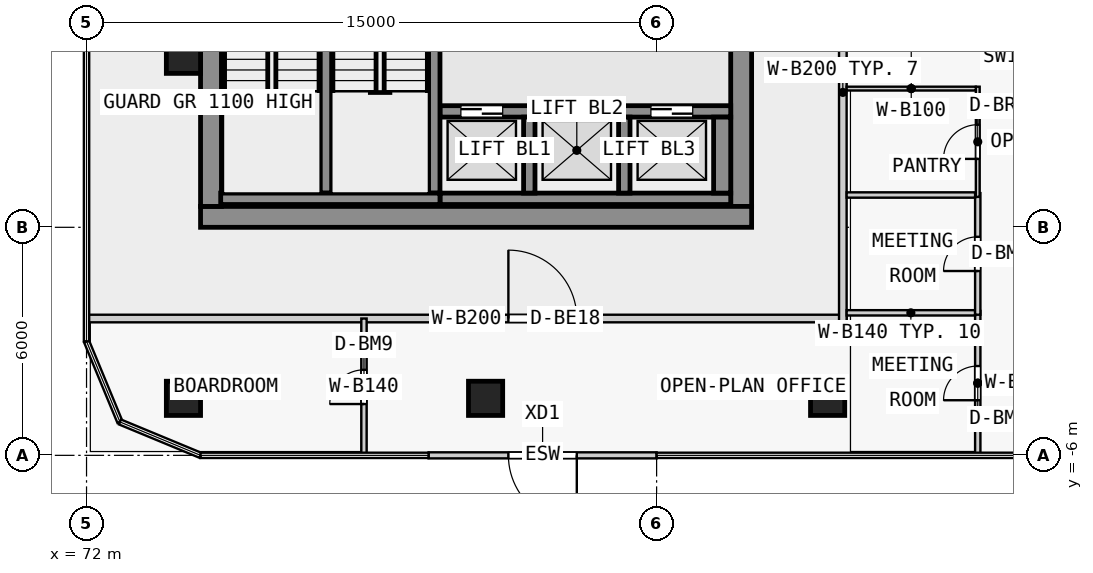
"""IFC4 building model, lengths in metres.
Left out: names, types, materials, properties, quantities, classifications, styles, units other than length and angle.
Written with IfcOpenShell. Run it as: python <this file> out.ifc"""

import sys

from ifc_helpers import new_model, si_unit, direction, frame, frame_2d, origin, origin_2d, place, context, subcontext, project, spatial, rectangle, extrude, element, fill, save


model = new_model("IFC4")
c1 = context("Model", 3, precision=1e-05, world=origin(), true_north=direction((0.0, 1.0)))
c2 = subcontext(c1, "Body", "Model", "MODEL_VIEW")
j1 = project(units=[si_unit("LENGTHUNIT", "METRE"), si_unit("PLANEANGLEUNIT", "RADIAN")], contexts=[c1])
p1 = place(None, origin())
s1 = spatial("IfcSite", under=j1, at=p1, CompositionType="ELEMENT")
p2 = place(p1, origin())
s2 = spatial("IfcBuilding", under=s1, at=p2, CompositionType="ELEMENT")
p3 = place(p2, frame((0.0, 0.0, 26.8)))
s3 = spatial("IfcBuildingStorey", under=s2, at=p3, CompositionType="ELEMENT", Elevation=26.8)
for number, where, z_axis, x_axis in (
    (1, (74.55, -4.5, 0.0), (0.0, 0.0, 1.0), (1.0, 0.0, 0.0)),
    (2, (82.5, -4.5, 0.0), (0.0, 0.0, 1.0), (1.0, 0.0, 0.0)),
    (3, (91.5, -4.5, 0.0), (0.0, 0.0, 1.0), (1.0, 0.0, 0.0)),
    (4, (74.55, 4.5, 0.0), (0.0, 0.0, 1.0), (1.0, 0.0, 0.0)),
):
    element("IfcColumn", number, at=place(p3, frame(where, z_axis=z_axis, x_axis=x_axis)), inside=s3, PredefinedType="COLUMN", context=c2, shape_type="SweptSolid", body=[
        extrude(rectangle(XDim=0.9, YDim=0.9, at=origin_2d()), origin(), (0.0, 0.0, 1.0), 3.5),
    ])
p4 = place(p3, frame((75.0, 0.275, 0.0), z_axis=(0.0, 0.0, 1.0), x_axis=(1.0, 0.0, 0.0)))
e5 = element("IfcWall", 5, at=p4, inside=s3, PredefinedType="SHEAR", context=c2, shape_type="SweptSolid", body=[
    extrude(rectangle(XDim=14.5, YDim=0.55, at=frame_2d((7.25, 0.0))), origin(), (0.0, 0.0, 1.0), 3.25),
])
p5 = place(p3, frame((75.275, 0.55, 0.0), z_axis=(0.0, 0.0, 1.0), x_axis=(0.0, 1.0, 0.0)))
e6 = element("IfcWall", 6, at=p5, inside=s3, PredefinedType="SHEAR", context=c2, shape_type="SweptSolid", body=[
    extrude(rectangle(XDim=16.9, YDim=0.55, at=frame_2d((8.45, 0.0))), origin(), (0.0, 0.0, 1.0), 3.25),
])
p6 = place(p5, frame((7.825, 0.0, 0.0)))
e7 = element("IfcOpeningElement", 7, at=p6, cuts=e6, PredefinedType="OPENING", context=c2, shape_type="SweptSolid", body=[
    extrude(rectangle(XDim=1.8, YDim=2.1, at=frame_2d((0.9, 1.05))), frame((0.0, 0.285, 0.0), z_axis=(0.0, -1.0, 0.0), x_axis=(1.0, 0.0, 0.0)), (0.0, 0.0, 1.0), 0.57),
])
p7 = place(p3, frame((89.225, 0.55, 0.0), z_axis=(0.0, 0.0, 1.0), x_axis=(0.0, 1.0, 0.0)))
e8 = element("IfcWall", 8, at=p7, inside=s3, PredefinedType="SHEAR", context=c2, shape_type="SweptSolid", body=[
    extrude(rectangle(XDim=16.9, YDim=0.55, at=frame_2d((8.45, 0.0))), origin(), (0.0, 0.0, 1.0), 3.25),
])
p8 = place(p7, frame((7.55, 0.0, 0.0)))
e9 = element("IfcOpeningElement", 9, at=p8, cuts=e8, PredefinedType="OPENING", context=c2, shape_type="SweptSolid", body=[
    extrude(rectangle(XDim=1.8, YDim=2.1, at=frame_2d((0.9, 1.05))), frame((0.0, 0.285, 0.0), z_axis=(0.0, -1.0, 0.0), x_axis=(1.0, 0.0, 0.0)), (0.0, 0.0, 1.0), 0.57),
])
p9 = place(p3, frame((75.53, 0.75, 0.0), z_axis=(0.0, 0.0, 1.0), x_axis=(1.0, 0.0, 0.0)))
e10 = element("IfcWall", 10, at=p9, inside=s3, PredefinedType="SHEAR", context=c2, shape_type="SweptSolid", body=[
    extrude(rectangle(XDim=5.77, YDim=0.3, at=frame_2d((2.885, 0.0))), origin(), (0.0, 0.0, 1.0), 3.25),
])
for number, where, z_axis, x_axis in (
    (11, (78.3, 0.9, 0.0), (0.0, 0.0, 1.0), (0.0, 1.0, 0.0)),
    (12, (81.15, 0.9, 0.0), (0.0, 0.0, 1.0), (0.0, 1.0, 0.0)),
):
    element("IfcWall", number, at=place(p3, frame(where, z_axis=z_axis, x_axis=x_axis)), inside=s3, PredefinedType="SHEAR", context=c2, shape_type="SweptSolid", body=[
        extrude(rectangle(XDim=6.4, YDim=0.3, at=frame_2d((3.2, 0.0))), origin(), (0.0, 0.0, 1.0), 3.25),
    ])
p10 = place(p3, frame((81.3, 0.75, 0.0), z_axis=(0.0, 0.0, 1.0), x_axis=(1.0, 0.0, 0.0)))
e13 = element("IfcWall", 13, at=p10, inside=s3, PredefinedType="SHEAR", context=c2, shape_type="SweptSolid", body=[
    extrude(rectangle(XDim=7.65, YDim=0.3, at=frame_2d((3.825, 0.0))), origin(), (0.0, 0.0, 1.0), 3.25),
])
for number, where, z_axis, x_axis in (
    (14, (83.65, 0.9, 0.0), (0.0, 0.0, 1.0), (0.0, 1.0, 0.0)),
    (15, (86.15, 0.9, 0.0), (0.0, 0.0, 1.0), (0.0, 1.0, 0.0)),
):
    element("IfcWall", number, at=place(p3, frame(where, z_axis=z_axis, x_axis=x_axis)), inside=s3, PredefinedType="SHEAR", context=c2, shape_type="SweptSolid", body=[
        extrude(rectangle(XDim=2.0, YDim=0.3, at=frame_2d((1.0, 0.0))), origin(), (0.0, 0.0, 1.0), 3.25),
    ])
p11 = place(p3, frame((88.725, 0.9, 0.0), z_axis=(0.0, 0.0, 1.0), x_axis=(0.0, 1.0, 0.0)))
e16 = element("IfcWall", 16, at=p11, inside=s3, PredefinedType="SHEAR", context=c2, shape_type="SweptSolid", body=[
    extrude(rectangle(XDim=2.0, YDim=0.45, at=frame_2d((1.0, 0.0))), origin(), (0.0, 0.0, 1.0), 3.25),
])
p12 = place(p3, frame((81.3, 3.05, 0.0), z_axis=(0.0, 0.0, 1.0), x_axis=(1.0, 0.0, 0.0)))
e17 = element("IfcWall", 17, at=p12, inside=s3, PredefinedType="SHEAR", context=c2, shape_type="SweptSolid", body=[
    extrude(rectangle(XDim=7.65, YDim=0.3, at=frame_2d((3.825, 0.0))), origin(), (0.0, 0.0, 1.0), 3.25),
])
p13 = place(p12, frame((0.55, 0.0, 0.0)))
e18 = element("IfcOpeningElement", 18, at=p13, cuts=e17, PredefinedType="OPENING", context=c2, shape_type="SweptSolid", body=[
    extrude(rectangle(XDim=1.1, YDim=2.1, at=frame_2d((0.55, 1.05))), frame((0.0, 0.16, 0.0), z_axis=(0.0, -1.0, 0.0), x_axis=(1.0, 0.0, 0.0)), (0.0, 0.0, 1.0), 0.32),
])
p14 = place(p12, frame((3.05, 0.0, 0.0)))
e19 = element("IfcOpeningElement", 19, at=p14, cuts=e17, PredefinedType="OPENING", context=c2, shape_type="SweptSolid", body=[
    extrude(rectangle(XDim=1.1, YDim=2.1, at=frame_2d((0.55, 1.05))), frame((0.0, 0.16, 0.0), z_axis=(0.0, -1.0, 0.0), x_axis=(1.0, 0.0, 0.0)), (0.0, 0.0, 1.0), 0.32),
])
p15 = place(p12, frame((5.55, 0.0, 0.0)))
e20 = element("IfcOpeningElement", 20, at=p15, cuts=e17, PredefinedType="OPENING", context=c2, shape_type="SweptSolid", body=[
    extrude(rectangle(XDim=1.1, YDim=2.1, at=frame_2d((0.55, 1.05))), frame((0.0, 0.16, 0.0), z_axis=(0.0, -1.0, 0.0), x_axis=(1.0, 0.0, 0.0)), (0.0, 0.0, 1.0), 0.32),
])
p16 = place(p3, frame((87.0, -6.0, 0.0), z_axis=(0.0, 0.0, 1.0), x_axis=(-1.0, 0.0, 0.0)))
e21 = element("IfcWall", 21, at=p16, inside=s3, PredefinedType="STANDARD", context=c2, shape_type="SweptSolid", body=[
    extrude(rectangle(XDim=6.0, YDim=0.16, at=frame_2d((3.0, 0.0))), origin(), (0.0, 0.0, 1.0), 3.25),
])
p17 = place(p16, frame((2.1, 0.0, 0.0)))
e22 = element("IfcOpeningElement", 22, at=p17, cuts=e21, PredefinedType="OPENING", context=c2, shape_type="SweptSolid", body=[
    extrude(rectangle(XDim=1.8, YDim=2.4, at=frame_2d((0.9, 1.2))), frame((0.0, 0.09, 0.0), z_axis=(0.0, -1.0, 0.0), x_axis=(1.0, 0.0, 0.0)), (0.0, 0.0, 1.0), 0.18),
])
p18 = place(p3, frame((72.0, -2.4, 0.0), z_axis=(0.0, 0.0, 1.0), x_axis=(1.0, 0.0, 0.0)))
e23 = element("IfcWall", 23, at=p18, inside=s3, PredefinedType="PARTITIONING", context=c2, shape_type="SweptSolid", body=[
    extrude(rectangle(XDim=20.0, YDim=0.2, at=frame_2d((10.0, 0.0))), origin(), (0.0, 0.0, 1.0), 3.25),
])
p19 = place(p18, frame((11.1, 0.0, 0.0)))
e24 = element("IfcOpeningElement", 24, at=p19, cuts=e23, PredefinedType="OPENING", context=c2, shape_type="SweptSolid", body=[
    extrude(rectangle(XDim=1.8, YDim=2.1, at=frame_2d((0.9, 1.05))), frame((0.0, 0.11, 0.0), z_axis=(0.0, -1.0, 0.0), x_axis=(1.0, 0.0, 0.0)), (0.0, 0.0, 1.0), 0.22),
])
p20 = place(p3, frame((91.9, -2.5, 0.0), z_axis=(0.0, 0.0, 1.0), x_axis=(0.0, 1.0, 0.0)))
e25 = element("IfcWall", 25, at=p20, inside=s3, PredefinedType="PARTITIONING", context=c2, shape_type="SweptSolid", body=[
    extrude(rectangle(XDim=12.1, YDim=0.2, at=frame_2d((6.05, 0.0))), origin(), (0.0, 0.0, 1.0), 3.25),
])
p21 = place(p3, frame((79.3, -6.0, 0.0), z_axis=(0.0, 0.0, 1.0), x_axis=(0.0, 1.0, 0.0)))
e26 = element("IfcWall", 26, at=p21, inside=s3, PredefinedType="PARTITIONING", context=c2, shape_type="SweptSolid", body=[
    extrude(rectangle(XDim=3.6, YDim=0.14, at=frame_2d((1.8, 0.0))), origin(), (0.0, 0.0, 1.0), 3.25),
])
p22 = place(p21, frame((1.35, 0.0, 0.0)))
e27 = element("IfcOpeningElement", 27, at=p22, cuts=e26, PredefinedType="OPENING", context=c2, shape_type="SweptSolid", body=[
    extrude(rectangle(XDim=0.9, YDim=2.4, at=frame_2d((0.45, 1.2))), frame((0.0, 0.08, 0.0), z_axis=(0.0, -1.0, 0.0), x_axis=(1.0, 0.0, 0.0)), (0.0, 0.0, 1.0), 0.16),
])
p23 = place(p3, frame((95.45, -6.0, 0.0), z_axis=(0.0, 0.0, 1.0), x_axis=(0.0, 1.0, 0.0)))
e28 = element("IfcWall", 28, at=p23, inside=s3, PredefinedType="PARTITIONING", context=c2, shape_type="SweptSolid", body=[
    extrude(rectangle(XDim=3.8, YDim=0.14, at=frame_2d((1.9, 0.0))), origin(), (0.0, 0.0, 1.0), 3.25),
])
p24 = place(p23, frame((1.45, 0.0, 0.0)))
e29 = element("IfcOpeningElement", 29, at=p24, cuts=e28, PredefinedType="OPENING", context=c2, shape_type="SweptSolid", body=[
    extrude(rectangle(XDim=0.9, YDim=2.4, at=frame_2d((0.45, 1.2))), frame((0.0, 0.08, 0.0), z_axis=(0.0, -1.0, 0.0), x_axis=(1.0, 0.0, 0.0)), (0.0, 0.0, 1.0), 0.16),
])
p25 = place(p3, frame((92.0, -2.25, 0.0), z_axis=(0.0, 0.0, 1.0), x_axis=(1.0, 0.0, 0.0)))
e30 = element("IfcWall", 30, at=p25, inside=s3, PredefinedType="PARTITIONING", context=c2, shape_type="SweptSolid", body=[
    extrude(rectangle(XDim=3.38, YDim=0.14, at=frame_2d((1.69, 0.0))), origin(), (0.0, 0.0, 1.0), 3.25),
])
p26 = place(p3, frame((95.45, -2.3, 0.0), z_axis=(0.0, 0.0, 1.0), x_axis=(0.0, 1.0, 0.0)))
e31 = element("IfcWall", 31, at=p26, inside=s3, PredefinedType="PARTITIONING", context=c2, shape_type="SweptSolid", body=[
    extrude(rectangle(XDim=3.2, YDim=0.14, at=frame_2d((1.6, 0.0))), origin(), (0.0, 0.0, 1.0), 3.25),
])
p27 = place(p26, frame((1.15, 0.0, 0.0)))
e32 = element("IfcOpeningElement", 32, at=p27, cuts=e31, PredefinedType="OPENING", context=c2, shape_type="SweptSolid", body=[
    extrude(rectangle(XDim=0.9, YDim=2.4, at=frame_2d((0.45, 1.2))), frame((0.0, 0.08, 0.0), z_axis=(0.0, -1.0, 0.0), x_axis=(1.0, 0.0, 0.0)), (0.0, 0.0, 1.0), 0.16),
])
p28 = place(p3, frame((92.0, 0.85, 0.0), z_axis=(0.0, 0.0, 1.0), x_axis=(1.0, 0.0, 0.0)))
e33 = element("IfcWall", 33, at=p28, inside=s3, PredefinedType="PARTITIONING", context=c2, shape_type="SweptSolid", body=[
    extrude(rectangle(XDim=3.38, YDim=0.14, at=frame_2d((1.69, 0.0))), origin(), (0.0, 0.0, 1.0), 3.25),
])
p29 = place(p3, frame((95.45, 0.8, 0.0), z_axis=(0.0, 0.0, 1.0), x_axis=(0.0, 1.0, 0.0)))
e34 = element("IfcWall", 34, at=p29, inside=s3, PredefinedType="PARTITIONING", context=c2, shape_type="SweptSolid", body=[
    extrude(rectangle(XDim=2.9, YDim=0.1, at=frame_2d((1.45, 0.0))), origin(), (0.0, 0.0, 1.0), 3.25),
])
p30 = place(p29, frame((1.0, 0.0, 0.0)))
e35 = element("IfcOpeningElement", 35, at=p30, cuts=e34, PredefinedType="OPENING", context=c2, shape_type="SweptSolid", body=[
    extrude(rectangle(XDim=0.9, YDim=2.1, at=frame_2d((0.45, 1.05))), frame((0.0, 0.06, 0.0), z_axis=(0.0, -1.0, 0.0), x_axis=(1.0, 0.0, 0.0)), (0.0, 0.0, 1.0), 0.12),
])
p31 = place(p3, frame((92.0, 3.65, 0.0), z_axis=(0.0, 0.0, 1.0), x_axis=(1.0, 0.0, 0.0)))
e36 = element("IfcWall", 36, at=p31, inside=s3, PredefinedType="PARTITIONING", context=c2, shape_type="SweptSolid", body=[
    extrude(rectangle(XDim=3.4, YDim=0.1, at=frame_2d((1.7, 0.0))), origin(), (0.0, 0.0, 1.0), 3.25),
])
p32 = place(p17, origin())
e37 = element("IfcDoor", 37, at=p32, inside=s3, OperationType="SINGLE_SWING_LEFT", PredefinedType="DOOR", context=c2, shape_type="SweptSolid", body=[
    extrude(rectangle(XDim=1.8, YDim=2.4, at=frame_2d((0.9, 1.2))), frame((0.0, 0.025, 0.0), z_axis=(0.0, -1.0, 0.0), x_axis=(1.0, 0.0, 0.0)), (0.0, 0.0, 1.0), 0.05),
])
fill(e22, e37)
p33 = place(p13, origin())
e38 = element("IfcDoor", 38, at=p33, inside=s3, OperationType="DOUBLE_DOOR_SLIDING", PredefinedType="DOOR", context=c2, shape_type="SweptSolid", body=[
    extrude(rectangle(XDim=1.1, YDim=2.1, at=frame_2d((0.55, 1.05))), frame((0.0, 0.025, 0.0), z_axis=(0.0, -1.0, 0.0), x_axis=(1.0, 0.0, 0.0)), (0.0, 0.0, 1.0), 0.05),
])
fill(e18, e38)
p34 = place(p14, origin())
e39 = element("IfcDoor", 39, at=p34, inside=s3, OperationType="DOUBLE_DOOR_SLIDING", PredefinedType="DOOR", context=c2, shape_type="SweptSolid", body=[
    extrude(rectangle(XDim=1.1, YDim=2.1, at=frame_2d((0.55, 1.05))), frame((0.0, 0.025, 0.0), z_axis=(0.0, -1.0, 0.0), x_axis=(1.0, 0.0, 0.0)), (0.0, 0.0, 1.0), 0.05),
])
fill(e19, e39)
p35 = place(p15, origin())
e40 = element("IfcDoor", 40, at=p35, inside=s3, OperationType="DOUBLE_DOOR_SLIDING", PredefinedType="DOOR", context=c2, shape_type="SweptSolid", body=[
    extrude(rectangle(XDim=1.1, YDim=2.1, at=frame_2d((0.55, 1.05))), frame((0.0, 0.025, 0.0), z_axis=(0.0, -1.0, 0.0), x_axis=(1.0, 0.0, 0.0)), (0.0, 0.0, 1.0), 0.05),
])
fill(e20, e40)
p36 = place(p19, origin())
e41 = element("IfcDoor", 41, at=p36, inside=s3, OperationType="DOUBLE_DOOR_SINGLE_SWING", PredefinedType="DOOR", context=c2, shape_type="SweptSolid", body=[
    extrude(rectangle(XDim=1.8, YDim=2.1, at=frame_2d((0.9, 1.05))), frame((0.0, 0.025, 0.0), z_axis=(0.0, -1.0, 0.0), x_axis=(1.0, 0.0, 0.0)), (0.0, 0.0, 1.0), 0.05),
])
fill(e24, e41)
p37 = place(p22, origin())
e42 = element("IfcDoor", 42, at=p37, inside=s3, OperationType="SINGLE_SWING_LEFT", PredefinedType="DOOR", context=c2, shape_type="SweptSolid", body=[
    extrude(rectangle(XDim=0.9, YDim=2.4, at=frame_2d((0.45, 1.2))), frame((0.0, 0.025, 0.0), z_axis=(0.0, -1.0, 0.0), x_axis=(1.0, 0.0, 0.0)), (0.0, 0.0, 1.0), 0.05),
])
fill(e27, e42)
p38 = place(p24, origin())
e43 = element("IfcDoor", 43, at=p38, inside=s3, OperationType="SINGLE_SWING_LEFT", PredefinedType="DOOR", context=c2, shape_type="SweptSolid", body=[
    extrude(rectangle(XDim=0.9, YDim=2.4, at=frame_2d((0.45, 1.2))), frame((0.0, 0.025, 0.0), z_axis=(0.0, -1.0, 0.0), x_axis=(1.0, 0.0, 0.0)), (0.0, 0.0, 1.0), 0.05),
])
fill(e29, e43)
p39 = place(p27, origin())
e44 = element("IfcDoor", 44, at=p39, inside=s3, OperationType="SINGLE_SWING_LEFT", PredefinedType="DOOR", context=c2, shape_type="SweptSolid", body=[
    extrude(rectangle(XDim=0.9, YDim=2.4, at=frame_2d((0.45, 1.2))), frame((0.0, 0.025, 0.0), z_axis=(0.0, -1.0, 0.0), x_axis=(1.0, 0.0, 0.0)), (0.0, 0.0, 1.0), 0.05),
])
fill(e32, e44)
p40 = place(p30, origin())
e45 = element("IfcDoor", 45, at=p40, inside=s3, OperationType="SINGLE_SWING_LEFT", PredefinedType="DOOR", context=c2, shape_type="SweptSolid", body=[
    extrude(rectangle(XDim=0.9, YDim=2.1, at=frame_2d((0.45, 1.05))), frame((0.0, 0.025, 0.0), z_axis=(0.0, -1.0, 0.0), x_axis=(1.0, 0.0, 0.0)), (0.0, 0.0, 1.0), 0.05),
])
fill(e35, e45)
save(model, sys.argv[1])
